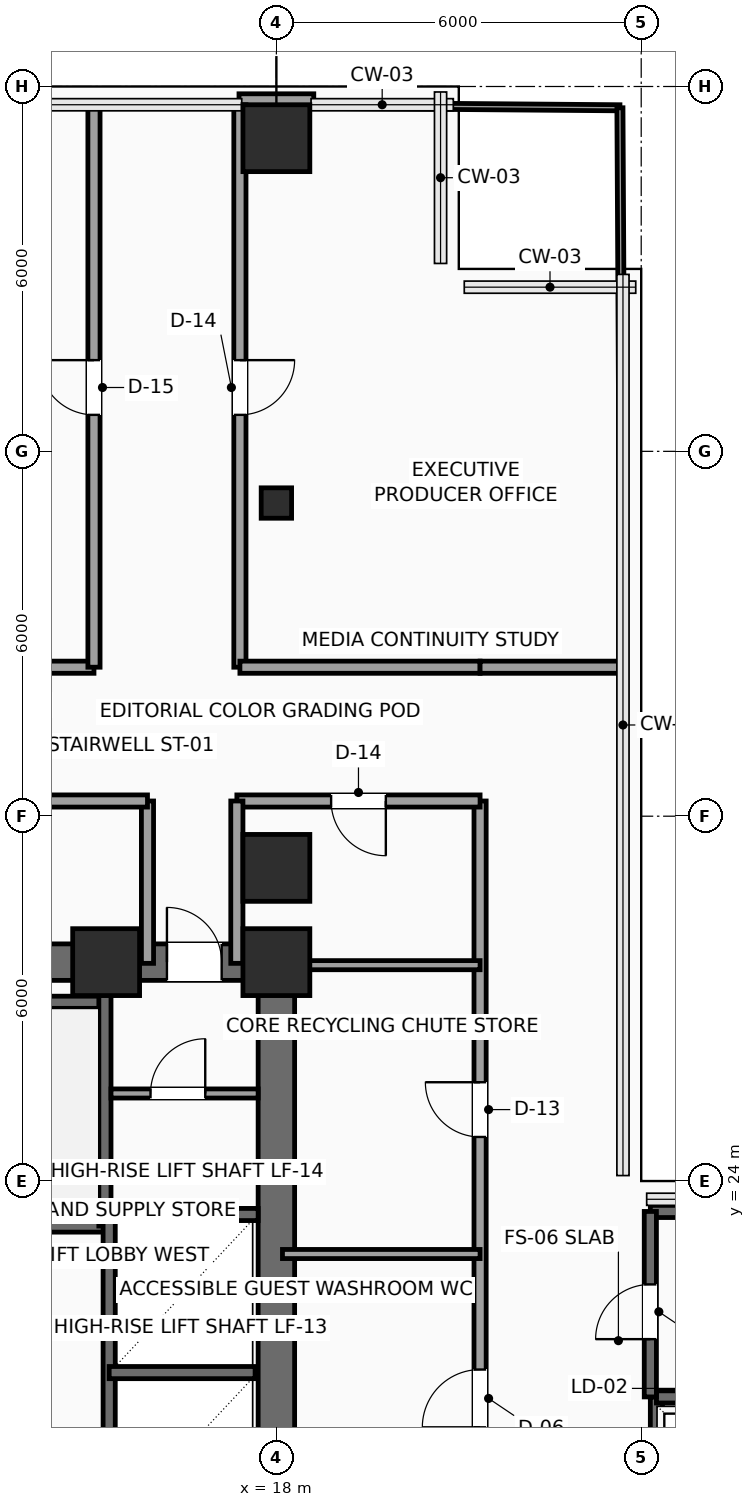
"""IFC4 building model, lengths in metres.
Left out: names, types, materials, properties, quantities, classifications, styles, units other than length and angle.
Written with IfcOpenShell. Run it as: python <this file> out.ifc"""

import sys

from ifc_helpers import new_model, si_unit, direction, frame, frame_2d, origin, origin_2d, place, context, subcontext, project, spatial, rectangle, hollow_rectangle, extrude, element, fill, save


model = new_model("IFC4")
c1 = context("Model", 3, precision=1e-05, world=origin(), true_north=direction((0.0, 1.0)))
c2 = subcontext(c1, "Body", "Model", "MODEL_VIEW")
j1 = project(units=[si_unit("LENGTHUNIT", "METRE"), si_unit("PLANEANGLEUNIT", "RADIAN")], contexts=[c1])
p1 = place(None, origin())
s1 = spatial("IfcSite", under=j1, at=p1, CompositionType="ELEMENT")
p2 = place(p1, origin())
s2 = spatial("IfcBuilding", under=s1, at=p2, CompositionType="ELEMENT")
p3 = place(p2, frame((0.0, 0.0, 141.9)))
s3 = spatial("IfcBuildingStorey", under=s2, at=p3, CompositionType="ELEMENT", Elevation=141.9)
for number, where, z_axis, x_axis in (
    (1, (15.2, 27.6, 0.0), (0.0, 0.0, 1.0), (1.0, 0.0, 0.0)),
    (2, (18.0, 27.6, 0.0), (0.0, 0.0, 1.0), (1.0, 0.0, 0.0)),
    (3, (18.0, 29.15, 0.0), (0.0, 0.0, 1.0), (1.0, 0.0, 0.0)),
):
    element("IfcColumn", number, at=place(p3, frame(where, z_axis=z_axis, x_axis=x_axis)), inside=s3, PredefinedType="COLUMN", context=c2, shape_type="SweptSolid", body=[
        extrude(rectangle(XDim=1.1, YDim=1.1, at=origin_2d()), origin(), (0.0, 0.0, 1.0), 3.75),
    ])
p4 = place(p3, frame((18.0, 35.15, 0.0), z_axis=(0.0, 0.0, 1.0), x_axis=(1.0, 0.0, 0.0)))
e4 = element("IfcColumn", 4, at=p4, inside=s3, PredefinedType="COLUMN", context=c2, shape_type="SweptSolid", body=[
    extrude(hollow_rectangle(XDim=0.5, YDim=0.5, WallThickness=0.025, InnerFilletRadius=0.025, OuterFilletRadius=0.04, at=origin_2d()), origin(), (0.0, 0.0, 1.0), 3.75),
])
p5 = place(p3, frame((18.0, 41.15, 0.0), z_axis=(0.0, 0.0, 1.0), x_axis=(1.0, 0.0, 0.0)))
e5 = element("IfcColumn", 5, at=p5, inside=s3, PredefinedType="COLUMN", context=c2, shape_type="SweptSolid", body=[
    extrude(rectangle(XDim=1.1, YDim=1.1, at=origin_2d()), origin(), (0.0, 0.0, 1.0), 3.75),
])
p6 = place(p3, frame((17.385, 41.76, 0.0), z_axis=(0.0, 0.0, 1.0), x_axis=(1.0, 0.0, 0.0)))
e6 = element("IfcWall", 6, at=p6, inside=s3, PredefinedType="SOLIDWALL", context=c2, shape_type="SweptSolid", body=[
    extrude(rectangle(XDim=1.23, YDim=0.24, at=frame_2d((0.615, 0.0))), origin(), (0.0, 0.0, 1.0), 3.525),
])
p7 = place(p3, frame((6.0, 27.6, 0.0), z_axis=(0.0, 0.0, 1.0), x_axis=(1.0, 0.0, 0.0)))
e7 = element("IfcWall", 7, at=p7, inside=s3, PredefinedType="SHEAR", context=c2, shape_type="SweptSolid", body=[
    extrude(rectangle(XDim=12.0, YDim=0.6, at=frame_2d((6.0, 0.0))), origin(), (0.0, 0.0, 1.0), 3.525),
])
p8 = place(p7, frame((10.2, 0.0, 0.0)))
e8 = element("IfcOpeningElement", 8, at=p8, cuts=e7, PredefinedType="OPENING", context=c2, shape_type="SweptSolid", body=[
    extrude(rectangle(XDim=0.9, YDim=2.15, at=frame_2d((0.45, 1.075))), frame((0.0, 0.31, 0.0), z_axis=(0.0, -1.0, 0.0), x_axis=(1.0, 0.0, 0.0)), (0.0, 0.0, 1.0), 0.62),
])
p9 = place(p3, frame((18.0, 18.0, 0.0), z_axis=(0.0, 0.0, 1.0), x_axis=(0.0, 1.0, 0.0)))
e9 = element("IfcWall", 9, at=p9, inside=s3, PredefinedType="SHEAR", context=c2, shape_type="SweptSolid", body=[
    extrude(rectangle(XDim=9.6, YDim=0.6, at=frame_2d((4.8, 0.0))), origin(), (0.0, 0.0, 1.0), 3.525),
])
p10 = place(p3, frame((6.3, 23.26, 0.0), z_axis=(0.0, 0.0, 1.0), x_axis=(1.0, 0.0, 0.0)))
e10 = element("IfcWall", 10, at=p10, inside=s3, PredefinedType="SHEAR", context=c2, shape_type="SweptSolid", body=[
    extrude(rectangle(XDim=8.88, YDim=0.2, at=frame_2d((4.44, 0.0))), origin(), (0.0, 0.0, 1.0), 3.525),
])
p11 = place(p10, frame((0.35, 0.0, 0.0)))
e11 = element("IfcOpeningElement", 11, at=p11, cuts=e10, PredefinedType="OPENING", context=c2, shape_type="SweptSolid", body=[
    extrude(rectangle(XDim=1.1, YDim=2.2, at=frame_2d((0.55, 1.1))), frame((0.0, 0.11, 0.0), z_axis=(0.0, -1.0, 0.0), x_axis=(1.0, 0.0, 0.0)), (0.0, 0.0, 1.0), 0.22),
])
p12 = place(p3, frame((6.3, 26.94, 0.0), z_axis=(0.0, 0.0, 1.0), x_axis=(1.0, 0.0, 0.0)))
e12 = element("IfcWall", 12, at=p12, inside=s3, PredefinedType="SHEAR", context=c2, shape_type="SweptSolid", body=[
    extrude(rectangle(XDim=8.88, YDim=0.2, at=frame_2d((4.44, 0.0))), origin(), (0.0, 0.0, 1.0), 3.525),
])
p13 = place(p3, frame((15.18, 23.26, 0.0), z_axis=(0.0, 0.0, 1.0), x_axis=(0.0, 1.0, 0.0)))
e13 = element("IfcWall", 13, at=p13, inside=s3, PredefinedType="SHEAR", context=c2, shape_type="SweptSolid", body=[
    extrude(rectangle(XDim=4.04, YDim=0.2, at=frame_2d((2.02, 0.0))), origin(), (0.0, 0.0, 1.0), 3.525),
])
p14 = place(p3, frame((15.25, 18.25, 0.0), z_axis=(0.0, 0.0, 1.0), x_axis=(0.0, 1.0, 0.0)))
e14 = element("IfcWall", 14, at=p14, inside=s3, PredefinedType="SHEAR", context=c2, shape_type="SweptSolid", body=[
    extrude(rectangle(XDim=5.2, YDim=0.2, at=frame_2d((2.6, 0.0))), origin(), (0.0, 0.0, 1.0), 3.525),
])
p15 = place(p3, frame((15.25, 20.85, 0.0), z_axis=(0.0, 0.0, 1.0), x_axis=(1.0, 0.0, 0.0)))
e15 = element("IfcWall", 15, at=p15, inside=s3, PredefinedType="SHEAR", context=c2, shape_type="SweptSolid", body=[
    extrude(rectangle(XDim=2.4, YDim=0.2, at=frame_2d((1.2, 0.0))), origin(), (0.0, 0.0, 1.0), 3.525),
])
p16 = place(p3, frame((15.25, 23.45, 0.0), z_axis=(0.0, 0.0, 1.0), x_axis=(1.0, 0.0, 0.0)))
e16 = element("IfcWall", 16, at=p16, inside=s3, PredefinedType="SHEAR", context=c2, shape_type="SweptSolid", body=[
    extrude(rectangle(XDim=2.45, YDim=0.2, at=frame_2d((1.225, 0.0))), origin(), (0.0, 0.0, 1.0), 3.525),
])
p17 = place(p3, frame((15.28, 25.44, 0.0), z_axis=(0.0, 0.0, 1.0), x_axis=(1.0, 0.0, 0.0)))
e17 = element("IfcWall", 17, at=p17, inside=s3, PredefinedType="PARTITIONING", context=c2, shape_type="SweptSolid", body=[
    extrude(rectangle(XDim=2.42, YDim=0.15, at=frame_2d((1.21, 0.0))), origin(), (0.0, 0.0, 1.0), 3.525),
])
p18 = place(p17, frame((0.65, 0.0, 0.0)))
e18 = element("IfcOpeningElement", 18, at=p18, cuts=e17, PredefinedType="OPENING", context=c2, shape_type="SweptSolid", body=[
    extrude(rectangle(XDim=0.9, YDim=2.15, at=frame_2d((0.45, 1.075))), frame((0.0, 0.085, 0.0), z_axis=(0.0, -1.0, 0.0), x_axis=(1.0, 0.0, 0.0)), (0.0, 0.0, 1.0), 0.17),
])
p19 = place(p3, frame((24.25, 18.1, 0.0), z_axis=(0.0, 0.0, 1.0), x_axis=(0.0, 1.0, 0.0)))
e19 = element("IfcWall", 19, at=p19, inside=s3, PredefinedType="SHEAR", context=c2, shape_type="SweptSolid", body=[
    extrude(rectangle(XDim=2.35, YDim=0.2, at=frame_2d((1.175, 0.0))), origin(), (0.0, 0.0, 1.0), 3.525),
])
p20 = place(p3, frame((24.25, 20.45, 0.0), z_axis=(0.0, 0.0, 1.0), x_axis=(1.0, 0.0, 0.0)))
e20 = element("IfcWall", 20, at=p20, inside=s3, PredefinedType="SHEAR", context=c2, shape_type="SweptSolid", body=[
    extrude(rectangle(XDim=9.05, YDim=0.2, at=frame_2d((4.525, 0.0))), origin(), (0.0, 0.0, 1.0), 3.525),
])
p21 = place(p20, frame((0.4, 0.0, 0.0)))
e21 = element("IfcOpeningElement", 21, at=p21, cuts=e20, PredefinedType="OPENING", context=c2, shape_type="SweptSolid", body=[
    extrude(rectangle(XDim=1.2, YDim=2.2, at=frame_2d((0.6, 1.1))), frame((0.0, 0.11, 0.0), z_axis=(0.0, -1.0, 0.0), x_axis=(1.0, 0.0, 0.0)), (0.0, 0.0, 1.0), 0.22),
])
p22 = place(p20, frame((2.65, 0.0, 0.0)))
e22 = element("IfcOpeningElement", 22, at=p22, cuts=e20, PredefinedType="OPENING", context=c2, shape_type="SweptSolid", body=[
    extrude(rectangle(XDim=1.2, YDim=2.2, at=frame_2d((0.6, 1.1))), frame((0.0, 0.11, 0.0), z_axis=(0.0, -1.0, 0.0), x_axis=(1.0, 0.0, 0.0)), (0.0, 0.0, 1.0), 0.22),
])
p23 = place(p20, frame((4.9, 0.0, 0.0)))
e23 = element("IfcOpeningElement", 23, at=p23, cuts=e20, PredefinedType="OPENING", context=c2, shape_type="SweptSolid", body=[
    extrude(rectangle(XDim=1.2, YDim=2.2, at=frame_2d((0.6, 1.1))), frame((0.0, 0.11, 0.0), z_axis=(0.0, -1.0, 0.0), x_axis=(1.0, 0.0, 0.0)), (0.0, 0.0, 1.0), 0.22),
])
p24 = place(p20, frame((7.15, 0.0, 0.0)))
e24 = element("IfcOpeningElement", 24, at=p24, cuts=e20, PredefinedType="OPENING", context=c2, shape_type="SweptSolid", body=[
    extrude(rectangle(XDim=1.2, YDim=2.2, at=frame_2d((0.6, 1.1))), frame((0.0, 0.11, 0.0), z_axis=(0.0, -1.0, 0.0), x_axis=(1.0, 0.0, 0.0)), (0.0, 0.0, 1.0), 0.22),
])
p25 = place(p3, frame((24.15, 23.5, 0.0), z_axis=(0.0, 0.0, 1.0), x_axis=(1.0, 0.0, 0.0)))
e25 = element("IfcWall", 25, at=p25, inside=s3, PredefinedType="SHEAR", context=c2, shape_type="SweptSolid", body=[
    extrude(rectangle(XDim=9.15, YDim=0.2, at=frame_2d((4.575, 0.0))), origin(), (0.0, 0.0, 1.0), 3.525),
])
p26 = place(p3, frame((24.15, 20.45, 0.0), z_axis=(0.0, 0.0, 1.0), x_axis=(0.0, 1.0, 0.0)))
e26 = element("IfcWall", 26, at=p26, inside=s3, PredefinedType="SHEAR", context=c2, shape_type="SweptSolid", body=[
    extrude(rectangle(XDim=3.05, YDim=0.2, at=frame_2d((1.525, 0.0))), origin(), (0.0, 0.0, 1.0), 3.525),
])
p27 = place(p26, frame((0.95, 0.0, 0.0)))
e27 = element("IfcOpeningElement", 27, at=p27, cuts=e26, PredefinedType="OPENING", context=c2, shape_type="SweptSolid", body=[
    extrude(rectangle(XDim=0.9, YDim=2.15, at=frame_2d((0.45, 1.075))), frame((0.0, 0.11, 0.0), z_axis=(0.0, -1.0, 0.0), x_axis=(1.0, 0.0, 0.0)), (0.0, 0.0, 1.0), 0.22),
])
p28 = place(p3, frame((21.35, 11.25, 0.0), z_axis=(0.0, 0.0, 1.0), x_axis=(0.0, 1.0, 0.0)))
e28 = element("IfcWall", 28, at=p28, inside=s3, PredefinedType="PARTITIONING", context=c2, shape_type="SweptSolid", body=[
    extrude(rectangle(XDim=19.0, YDim=0.2, at=frame_2d((9.5, 0.0))), origin(), (0.0, 0.0, 1.0), 3.525),
])
p29 = place(p28, frame((8.7, 0.0, 0.0)))
e29 = element("IfcOpeningElement", 29, at=p29, cuts=e28, PredefinedType="OPENING", context=c2, shape_type="SweptSolid", body=[
    extrude(rectangle(XDim=0.95, YDim=2.15, at=frame_2d((0.475, 1.075))), frame((0.0, 0.11, 0.0), z_axis=(0.0, -1.0, 0.0), x_axis=(1.0, 0.0, 0.0)), (0.0, 0.0, 1.0), 0.22),
])
p30 = place(p28, frame((13.475, 0.0, 0.0)))
e30 = element("IfcOpeningElement", 30, at=p30, cuts=e28, PredefinedType="OPENING", context=c2, shape_type="SweptSolid", body=[
    extrude(rectangle(XDim=0.9, YDim=2.1, at=frame_2d((0.45, 1.05))), frame((0.0, 0.11, 0.0), z_axis=(0.0, -1.0, 0.0), x_axis=(1.0, 0.0, 0.0)), (0.0, 0.0, 1.0), 0.22),
])
p31 = place(p28, frame((5.05, 0.0, 0.0)))
e31 = element("IfcOpeningElement", 31, at=p31, cuts=e28, PredefinedType="OPENING", context=c2, shape_type="SweptSolid", body=[
    extrude(rectangle(XDim=0.9, YDim=2.1, at=frame_2d((0.45, 1.05))), frame((0.0, 0.11, 0.0), z_axis=(0.0, -1.0, 0.0), x_axis=(1.0, 0.0, 0.0)), (0.0, 0.0, 1.0), 0.22),
])
p32 = place(p3, frame((21.35, 30.25, 0.0), z_axis=(0.0, 0.0, 1.0), x_axis=(-1.0, 0.0, 0.0)))
e32 = element("IfcWall", 32, at=p32, inside=s3, PredefinedType="PARTITIONING", context=c2, shape_type="SweptSolid", body=[
    extrude(rectangle(XDim=4.0, YDim=0.2, at=frame_2d((2.0, 0.0))), origin(), (0.0, 0.0, 1.0), 3.525),
])
p33 = place(p32, frame((1.55, 0.0, 0.0)))
e33 = element("IfcOpeningElement", 33, at=p33, cuts=e32, PredefinedType="OPENING", context=c2, shape_type="SweptSolid", body=[
    extrude(rectangle(XDim=0.9, YDim=2.1, at=frame_2d((0.45, 1.05))), frame((0.0, 0.11, 0.0), z_axis=(0.0, -1.0, 0.0), x_axis=(1.0, 0.0, 0.0)), (0.0, 0.0, 1.0), 0.22),
])
for number, where, z_axis, x_axis in (
    (34, (17.35, 30.25, 0.0), (0.0, 0.0, 1.0), (0.0, -1.0, 0.0)),
    (35, (15.88, 27.58, 0.0), (0.0, 0.0, 1.0), (0.0, 1.0, 0.0)),
):
    element("IfcWall", number, at=place(p3, frame(where, z_axis=z_axis, x_axis=x_axis)), inside=s3, PredefinedType="PARTITIONING", context=c2, shape_type="SweptSolid", body=[
        extrude(rectangle(XDim=2.67, YDim=0.2, at=frame_2d((1.335, 0.0))), origin(), (0.0, 0.0, 1.0), 3.525),
    ])
p34 = place(p3, frame((15.88, 30.25, 0.0), z_axis=(0.0, 0.0, 1.0), x_axis=(-1.0, 0.0, 0.0)))
e36 = element("IfcWall", 36, at=p34, inside=s3, PredefinedType="PARTITIONING", context=c2, shape_type="SweptSolid", body=[
    extrude(rectangle(XDim=15.58, YDim=0.2, at=frame_2d((7.79, 0.0))), origin(), (0.0, 0.0, 1.0), 3.525),
])
p35 = place(p34, frame((12.28, 0.0, 0.0)))
e37 = element("IfcOpeningElement", 37, at=p35, cuts=e36, PredefinedType="OPENING", context=c2, shape_type="SweptSolid", body=[
    extrude(rectangle(XDim=0.9, YDim=2.1, at=frame_2d((0.45, 1.05))), frame((0.0, 0.11, 0.0), z_axis=(0.0, -1.0, 0.0), x_axis=(1.0, 0.0, 0.0)), (0.0, 0.0, 1.0), 0.22),
])
p36 = place(p34, frame((6.73, 0.0, 0.0)))
e38 = element("IfcOpeningElement", 38, at=p36, cuts=e36, PredefinedType="OPENING", context=c2, shape_type="SweptSolid", body=[
    extrude(rectangle(XDim=0.9, YDim=2.1, at=frame_2d((0.45, 1.05))), frame((0.0, 0.11, 0.0), z_axis=(0.0, -1.0, 0.0), x_axis=(1.0, 0.0, 0.0)), (0.0, 0.0, 1.0), 0.22),
])
p37 = place(p34, frame((1.98, 0.0, 0.0)))
e39 = element("IfcOpeningElement", 39, at=p37, cuts=e36, PredefinedType="OPENING", context=c2, shape_type="SweptSolid", body=[
    extrude(rectangle(XDim=0.9, YDim=2.1, at=frame_2d((0.45, 1.05))), frame((0.0, 0.11, 0.0), z_axis=(0.0, -1.0, 0.0), x_axis=(1.0, 0.0, 0.0)), (0.0, 0.0, 1.0), 0.22),
])
p38 = place(p3, frame((0.3, 32.45, 0.0), z_axis=(0.0, 0.0, 1.0), x_axis=(1.0, 0.0, 0.0)))
e40 = element("IfcWall", 40, at=p38, inside=s3, PredefinedType="PARTITIONING", context=c2, shape_type="SweptSolid", body=[
    extrude(rectangle(XDim=14.7, YDim=0.2, at=frame_2d((7.35, 0.0))), origin(), (0.0, 0.0, 1.0), 3.525),
])
p39 = place(p3, frame((15.0, 32.45, 0.0), z_axis=(0.0, 0.0, 1.0), x_axis=(0.0, 1.0, 0.0)))
e41 = element("IfcWall", 41, at=p39, inside=s3, PredefinedType="PARTITIONING", context=c2, shape_type="SweptSolid", body=[
    extrude(rectangle(XDim=9.25, YDim=0.2, at=frame_2d((4.625, 0.0))), origin(), (0.0, 0.0, 1.0), 3.525),
])
p40 = place(p39, frame((4.15, 0.0, 0.0)))
e42 = element("IfcOpeningElement", 42, at=p40, cuts=e41, PredefinedType="OPENING", context=c2, shape_type="SweptSolid", body=[
    extrude(rectangle(XDim=0.9, YDim=2.1, at=frame_2d((0.45, 1.05))), frame((0.0, 0.11, 0.0), z_axis=(0.0, -1.0, 0.0), x_axis=(1.0, 0.0, 0.0)), (0.0, 0.0, 1.0), 0.22),
])
p41 = place(p3, frame((17.4, 41.7, 0.0), z_axis=(0.0, 0.0, 1.0), x_axis=(0.0, -1.0, 0.0)))
e43 = element("IfcWall", 43, at=p41, inside=s3, PredefinedType="PARTITIONING", context=c2, shape_type="SweptSolid", body=[
    extrude(rectangle(XDim=9.25, YDim=0.2, at=frame_2d((4.625, 0.0))), origin(), (0.0, 0.0, 1.0), 3.525),
])
p42 = place(p41, frame((4.2, 0.0, 0.0)))
e44 = element("IfcOpeningElement", 44, at=p42, cuts=e43, PredefinedType="OPENING", context=c2, shape_type="SweptSolid", body=[
    extrude(rectangle(XDim=0.9, YDim=2.1, at=frame_2d((0.45, 1.05))), frame((0.0, 0.11, 0.0), z_axis=(0.0, -1.0, 0.0), x_axis=(1.0, 0.0, 0.0)), (0.0, 0.0, 1.0), 0.22),
])
p43 = place(p3, frame((17.4, 32.45, 0.0), z_axis=(0.0, 0.0, 1.0), x_axis=(1.0, 0.0, 0.0)))
e45 = element("IfcWall", 45, at=p43, inside=s3, PredefinedType="PARTITIONING", context=c2, shape_type="SweptSolid", body=[
    extrude(rectangle(XDim=3.95, YDim=0.2, at=frame_2d((1.975, 0.0))), origin(), (0.0, 0.0, 1.0), 3.525),
])
p44 = place(p3, frame((21.35, 32.45, 0.0), z_axis=(0.0, 0.0, 1.0), x_axis=(1.0, 0.0, 0.0)))
e46 = element("IfcWall", 46, at=p44, inside=s3, PredefinedType="PARTITIONING", context=c2, shape_type="SweptSolid", body=[
    extrude(rectangle(XDim=2.35, YDim=0.2, at=frame_2d((1.175, 0.0))), origin(), (0.0, 0.0, 1.0), 3.525),
])
for number, where, z_axis, x_axis in (
    (47, (18.1, 22.8, 0.0), (0.0, 0.0, 1.0), (1.0, 0.0, 0.0)),
    (48, (18.1, 27.55, 0.0), (0.0, 0.0, 1.0), (1.0, 0.0, 0.0)),
):
    element("IfcWall", number, at=place(p3, frame(where, z_axis=z_axis, x_axis=x_axis)), inside=s3, PredefinedType="PARTITIONING", context=c2, shape_type="SweptSolid", body=[
        extrude(rectangle(XDim=3.25, YDim=0.15, at=frame_2d((1.625, 0.0))), origin(), (0.0, 0.0, 1.0), 3.525),
    ])
p45 = place(p3, frame((6.615, 41.671, 0.0), z_axis=(0.0, 0.0, 1.0), x_axis=(0.999994197557, 0.003406589638, 0.0)))
e49 = element("IfcWall", 49, at=p45, inside=s3, PredefinedType="PARTITIONING", context=c2, shape_type="SweptSolid", body=[
    extrude(rectangle(XDim=8.385, YDim=0.1, at=frame_2d((4.192, 0.0))), origin(), (0.0, 0.0, 1.0), 3.525),
])
p46 = place(p3, frame((18.615, 41.69, 0.0), z_axis=(0.0, 0.0, 1.0), x_axis=(0.99996799533, -0.008000519771, 0.0)))
e50 = element("IfcWall", 50, at=p46, inside=s3, PredefinedType="PARTITIONING", context=c2, shape_type="SweptSolid", body=[
    extrude(rectangle(XDim=5.035, YDim=0.1, at=frame_2d((2.518, 0.0))), origin(), (0.0, 0.0, 1.0), 3.525),
])
p47 = place(p3, frame((23.7, 32.45, 0.0), z_axis=(0.0, 0.0, 1.0), x_axis=(-0.005440038388, 0.999985202882, 0.0)))
e51 = element("IfcWall", 51, at=p47, inside=s3, PredefinedType="PARTITIONING", context=c2, shape_type="SweptSolid", body=[
    extrude(rectangle(XDim=9.2, YDim=0.1, at=frame_2d((4.6, 0.0))), origin(), (0.0, 0.0, 1.0), 3.525),
])
p48 = place(p8, origin())
e52 = element("IfcDoor", 52, at=p48, inside=s3, OperationType="SINGLE_SWING_LEFT", PredefinedType="DOOR", context=c2, shape_type="SweptSolid", body=[
    extrude(rectangle(XDim=0.9, YDim=2.15, at=frame_2d((0.45, 1.075))), frame((0.0, 0.025, 0.0), z_axis=(0.0, -1.0, 0.0), x_axis=(1.0, 0.0, 0.0)), (0.0, 0.0, 1.0), 0.05),
])
fill(e8, e52)
p49 = place(p18, origin())
e53 = element("IfcDoor", 53, at=p49, inside=s3, OperationType="SINGLE_SWING_RIGHT", PredefinedType="DOOR", context=c2, shape_type="SweptSolid", body=[
    extrude(rectangle(XDim=0.9, YDim=2.15, at=frame_2d((0.45, 1.075))), frame((0.0, 0.025, 0.0), z_axis=(0.0, -1.0, 0.0), x_axis=(1.0, 0.0, 0.0)), (0.0, 0.0, 1.0), 0.05),
])
fill(e18, e53)
p50 = place(p27, origin())
e54 = element("IfcDoor", 54, at=p50, inside=s3, OperationType="SINGLE_SWING_LEFT", PredefinedType="DOOR", context=c2, shape_type="SweptSolid", body=[
    extrude(rectangle(XDim=0.9, YDim=2.15, at=frame_2d((0.45, 1.075))), frame((0.0, 0.025, 0.0), z_axis=(0.0, -1.0, 0.0), x_axis=(1.0, 0.0, 0.0)), (0.0, 0.0, 1.0), 0.05),
])
fill(e27, e54)
p51 = place(p29, origin())
e55 = element("IfcDoor", 55, at=p51, inside=s3, OperationType="SINGLE_SWING_LEFT", PredefinedType="DOOR", context=c2, shape_type="SweptSolid", body=[
    extrude(rectangle(XDim=0.95, YDim=2.15, at=frame_2d((0.475, 1.075))), frame((0.0, 0.025, 0.0), z_axis=(0.0, -1.0, 0.0), x_axis=(1.0, 0.0, 0.0)), (0.0, 0.0, 1.0), 0.05),
])
fill(e29, e55)
p52 = place(p30, origin())
e56 = element("IfcDoor", 56, at=p52, inside=s3, OperationType="SINGLE_SWING_RIGHT", PredefinedType="DOOR", context=c2, shape_type="SweptSolid", body=[
    extrude(rectangle(XDim=0.9, YDim=2.1, at=frame_2d((0.45, 1.05))), frame((0.0, 0.025, 0.0), z_axis=(0.0, -1.0, 0.0), x_axis=(1.0, 0.0, 0.0)), (0.0, 0.0, 1.0), 0.05),
])
fill(e30, e56)
p53 = place(p33, origin())
e57 = element("IfcDoor", 57, at=p53, inside=s3, OperationType="SINGLE_SWING_LEFT", PredefinedType="DOOR", context=c2, shape_type="SweptSolid", body=[
    extrude(rectangle(XDim=0.9, YDim=2.1, at=frame_2d((0.45, 1.05))), frame((0.0, 0.025, 0.0), z_axis=(0.0, -1.0, 0.0), x_axis=(1.0, 0.0, 0.0)), (0.0, 0.0, 1.0), 0.05),
])
fill(e33, e57)
p54 = place(p40, origin())
e58 = element("IfcDoor", 58, at=p54, inside=s3, OperationType="SINGLE_SWING_RIGHT", PredefinedType="DOOR", context=c2, shape_type="SweptSolid", body=[
    extrude(rectangle(XDim=0.9, YDim=2.1, at=frame_2d((0.45, 1.05))), frame((0.0, 0.025, 0.0), z_axis=(0.0, -1.0, 0.0), x_axis=(1.0, 0.0, 0.0)), (0.0, 0.0, 1.0), 0.05),
])
fill(e42, e58)
p55 = place(p42, origin())
e59 = element("IfcDoor", 59, at=p55, inside=s3, OperationType="SINGLE_SWING_LEFT", PredefinedType="DOOR", context=c2, shape_type="SweptSolid", body=[
    extrude(rectangle(XDim=0.9, YDim=2.1, at=frame_2d((0.45, 1.05))), frame((0.0, 0.025, 0.0), z_axis=(0.0, -1.0, 0.0), x_axis=(1.0, 0.0, 0.0)), (0.0, 0.0, 1.0), 0.05),
])
fill(e44, e59)
save(model, sys.argv[1])
